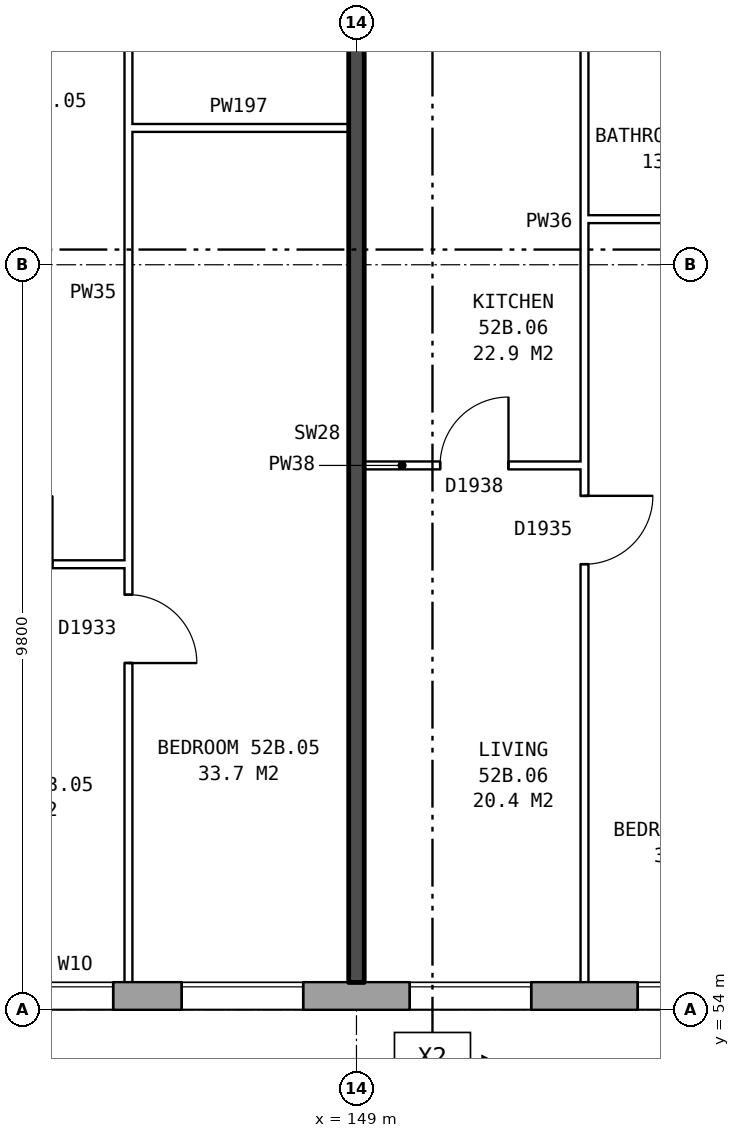
"""IFC4 building model, lengths in metres.
Left out: names, types, materials, properties, quantities, classifications, styles, units other than length and angle.
Written with IfcOpenShell. Run it as: python <this file> out.ifc"""

import sys

from ifc_helpers import new_model, si_unit, direction, frame, frame_2d, origin, place, context, subcontext, project, spatial, rectangle, extrude, element, fill, save


model = new_model("IFC4")
c1 = context("Model", 3, precision=1e-05, world=origin(), true_north=direction((0.0, 1.0)))
c2 = subcontext(c1, "Body", "Model", "MODEL_VIEW")
j1 = project(units=[si_unit("LENGTHUNIT", "METRE"), si_unit("PLANEANGLEUNIT", "RADIAN")], contexts=[c1])
p1 = place(None, origin())
s1 = spatial("IfcSite", under=j1, at=p1, CompositionType="ELEMENT")
p2 = place(p1, origin())
s2 = spatial("IfcBuilding", under=s1, at=p2, CompositionType="ELEMENT")
p3 = place(p2, frame((0.0, 0.0, 185.1)))
s3 = spatial("IfcBuildingStorey", under=s2, at=p3, CompositionType="ELEMENT", Elevation=185.1)
p4 = place(p3, frame((134.075, 54.18, 0.0), z_axis=(0.0, 0.0, 1.0), x_axis=(1.0, 0.0, 0.0)))
e1 = element("IfcWall", 1, at=p4, inside=s3, PredefinedType="STANDARD", context=c2, shape_type="SweptSolid", body=[
    extrude(rectangle(XDim=33.101, YDim=0.36, at=frame_2d((16.55, 0.0))), origin(), (0.0, 0.0, 1.0), 2.85),
])
p5 = place(p4, frame((0.625, 0.0, 0.8)))
e2 = element("IfcOpeningElement", 2, at=p5, cuts=e1, PredefinedType="OPENING", context=c2, shape_type="SweptSolid", body=[
    extrude(rectangle(XDim=1.6, YDim=1.8, at=frame_2d((0.8, 0.9))), frame((0.0, 0.19, 0.0), z_axis=(0.0, -1.0, 0.0), x_axis=(1.0, 0.0, 0.0)), (0.0, 0.0, 1.0), 0.38),
])
p6 = place(p4, frame((3.625, 0.0, 0.8)))
e3 = element("IfcOpeningElement", 3, at=p6, cuts=e1, PredefinedType="OPENING", context=c2, shape_type="SweptSolid", body=[
    extrude(rectangle(XDim=1.6, YDim=1.8, at=frame_2d((0.8, 0.9))), frame((0.0, 0.19, 0.0), z_axis=(0.0, -1.0, 0.0), x_axis=(1.0, 0.0, 0.0)), (0.0, 0.0, 1.0), 0.38),
])
p7 = place(p4, frame((6.625, 0.0, 0.8)))
e4 = element("IfcOpeningElement", 4, at=p7, cuts=e1, PredefinedType="OPENING", context=c2, shape_type="SweptSolid", body=[
    extrude(rectangle(XDim=1.6, YDim=1.8, at=frame_2d((0.8, 0.9))), frame((0.0, 0.19, 0.0), z_axis=(0.0, -1.0, 0.0), x_axis=(1.0, 0.0, 0.0)), (0.0, 0.0, 1.0), 0.38),
])
p8 = place(p4, frame((9.125, 0.0, 1.65)))
e5 = element("IfcOpeningElement", 5, at=p8, cuts=e1, PredefinedType="OPENING", context=c2, shape_type="SweptSolid", body=[
    extrude(rectangle(XDim=0.6, YDim=0.9, at=frame_2d((0.3, 0.45))), frame((0.0, 0.19, 0.0), z_axis=(0.0, -1.0, 0.0), x_axis=(1.0, 0.0, 0.0)), (0.0, 0.0, 1.0), 0.38),
])
p9 = place(p4, frame((12.625, 0.0, 0.8)))
e6 = element("IfcOpeningElement", 6, at=p9, cuts=e1, PredefinedType="OPENING", context=c2, shape_type="SweptSolid", body=[
    extrude(rectangle(XDim=1.6, YDim=1.8, at=frame_2d((0.8, 0.9))), frame((0.0, 0.19, 0.0), z_axis=(0.0, -1.0, 0.0), x_axis=(1.0, 0.0, 0.0)), (0.0, 0.0, 1.0), 0.38),
])
p10 = place(p4, frame((15.625, 0.0, 0.8)))
e7 = element("IfcOpeningElement", 7, at=p10, cuts=e1, PredefinedType="OPENING", context=c2, shape_type="SweptSolid", body=[
    extrude(rectangle(XDim=1.6, YDim=1.8, at=frame_2d((0.8, 0.9))), frame((0.0, 0.19, 0.0), z_axis=(0.0, -1.0, 0.0), x_axis=(1.0, 0.0, 0.0)), (0.0, 0.0, 1.0), 0.38),
])
p11 = place(p4, frame((18.625, 0.0, 0.8)))
e8 = element("IfcOpeningElement", 8, at=p11, cuts=e1, PredefinedType="OPENING", context=c2, shape_type="SweptSolid", body=[
    extrude(rectangle(XDim=1.6, YDim=1.8, at=frame_2d((0.8, 0.9))), frame((0.0, 0.19, 0.0), z_axis=(0.0, -1.0, 0.0), x_axis=(1.0, 0.0, 0.0)), (0.0, 0.0, 1.0), 0.38),
])
p12 = place(p4, frame((21.125, 0.0, 0.8)))
e9 = element("IfcOpeningElement", 9, at=p12, cuts=e1, PredefinedType="OPENING", context=c2, shape_type="SweptSolid", body=[
    extrude(rectangle(XDim=0.8, YDim=1.2, at=frame_2d((0.4, 0.6))), frame((0.0, 0.19, 0.0), z_axis=(0.0, -1.0, 0.0), x_axis=(1.0, 0.0, 0.0)), (0.0, 0.0, 1.0), 0.38),
])
p13 = place(p4, frame((24.625, 0.0, 0.8)))
e10 = element("IfcOpeningElement", 10, at=p13, cuts=e1, PredefinedType="OPENING", context=c2, shape_type="SweptSolid", body=[
    extrude(rectangle(XDim=1.6, YDim=1.8, at=frame_2d((0.8, 0.9))), frame((0.0, 0.19, 0.0), z_axis=(0.0, -1.0, 0.0), x_axis=(1.0, 0.0, 0.0)), (0.0, 0.0, 1.0), 0.38),
])
p14 = place(p4, frame((27.625, 0.0, 0.8)))
e11 = element("IfcOpeningElement", 11, at=p14, cuts=e1, PredefinedType="OPENING", context=c2, shape_type="SweptSolid", body=[
    extrude(rectangle(XDim=1.6, YDim=1.8, at=frame_2d((0.8, 0.9))), frame((0.0, 0.19, 0.0), z_axis=(0.0, -1.0, 0.0), x_axis=(1.0, 0.0, 0.0)), (0.0, 0.0, 1.0), 0.38),
])
p15 = place(p4, frame((30.625, 0.0, 0.8)))
e12 = element("IfcOpeningElement", 12, at=p15, cuts=e1, PredefinedType="OPENING", context=c2, shape_type="SweptSolid", body=[
    extrude(rectangle(XDim=1.6, YDim=1.8, at=frame_2d((0.8, 0.9))), frame((0.0, 0.19, 0.0), z_axis=(0.0, -1.0, 0.0), x_axis=(1.0, 0.0, 0.0)), (0.0, 0.0, 1.0), 0.38),
])
p16 = place(p4, frame((10.725, 0.0, 0.35)))
e13 = element("IfcOpeningElement", 13, at=p16, cuts=e1, PredefinedType="OPENING", context=c2, shape_type="SweptSolid", body=[
    extrude(rectangle(XDim=1.0, YDim=1.2, at=frame_2d((0.5, 0.6))), frame((0.0, 0.19, 0.0), z_axis=(0.0, -1.0, 0.0), x_axis=(1.0, 0.0, 0.0)), (0.0, 0.0, 1.0), 0.38),
])
p17 = place(p4, frame((23.525, 0.0, 1.4)))
e14 = element("IfcOpeningElement", 14, at=p17, cuts=e1, PredefinedType="OPENING", context=c2, shape_type="SweptSolid", body=[
    extrude(rectangle(XDim=0.8, YDim=1.2, at=frame_2d((0.4, 0.6))), frame((0.0, 0.19, 0.0), z_axis=(0.0, -1.0, 0.0), x_axis=(1.0, 0.0, 0.0)), (0.0, 0.0, 1.0), 0.38),
])
p18 = place(p3, frame((143.1, 59.86, 0.0), z_axis=(0.0, 0.0, 1.0), x_axis=(1.0, 0.0, 0.0)))
e15 = element("IfcWall", 15, at=p18, inside=s3, PredefinedType="PARTITIONING", context=c2, shape_type="SweptSolid", body=[
    extrude(rectangle(XDim=2.9, YDim=0.1, at=frame_2d((1.45, 0.0))), origin(), (0.0, 0.0, 1.0), 2.85),
])
p19 = place(p18, frame((1.0, 0.0, 0.0)))
e16 = element("IfcOpeningElement", 16, at=p19, cuts=e15, PredefinedType="OPENING", context=c2, shape_type="SweptSolid", body=[
    extrude(rectangle(XDim=0.9, YDim=2.1, at=frame_2d((0.45, 1.05))), frame((0.0, 0.06, 0.0), z_axis=(0.0, -1.0, 0.0), x_axis=(1.0, 0.0, 0.0)), (0.0, 0.0, 1.0), 0.12),
])
p20 = place(p3, frame((149.1, 61.16, 0.0), z_axis=(0.0, 0.0, 1.0), x_axis=(1.0, 0.0, 0.0)))
e17 = element("IfcWall", 17, at=p20, inside=s3, PredefinedType="PARTITIONING", context=c2, shape_type="SweptSolid", body=[
    extrude(rectangle(XDim=2.9, YDim=0.1, at=frame_2d((1.45, 0.0))), origin(), (0.0, 0.0, 1.0), 2.85),
])
p21 = place(p20, frame((1.0, 0.0, 0.0)))
e18 = element("IfcOpeningElement", 18, at=p21, cuts=e17, PredefinedType="OPENING", context=c2, shape_type="SweptSolid", body=[
    extrude(rectangle(XDim=0.9, YDim=2.1, at=frame_2d((0.45, 1.05))), frame((0.0, 0.06, 0.0), z_axis=(0.0, -1.0, 0.0), x_axis=(1.0, 0.0, 0.0)), (0.0, 0.0, 1.0), 0.12),
])
for number, where, z_axis, x_axis in (
    (19, (152.0, 64.4, 0.0), (0.0, 0.0, 1.0), (1.0, 0.0, 0.0)),
    (20, (146.0, 65.6, 0.0), (0.0, 0.0, 1.0), (1.0, 0.0, 0.0)),
):
    element("IfcWall", number, at=place(p3, frame(where, z_axis=z_axis, x_axis=x_axis)), inside=s3, PredefinedType="PARTITIONING", context=c2, shape_type="SweptSolid", body=[
        extrude(rectangle(XDim=2.9, YDim=0.1, at=frame_2d((1.45, 0.0))), origin(), (0.0, 0.0, 1.0), 2.85),
    ])
p22 = place(p3, frame((146.0, 54.36, 0.0), z_axis=(0.0, 0.0, 1.0), x_axis=(0.0, 1.0, 0.0)))
e21 = element("IfcWall", 21, at=p22, inside=s3, PredefinedType="PARTITIONING", context=c2, shape_type="SweptSolid", body=[
    extrude(rectangle(XDim=14.34, YDim=0.1, at=frame_2d((7.17, 0.0))), origin(), (0.0, 0.0, 1.0), 2.85),
])
p23 = place(p22, frame((4.2, 0.0, 0.0)))
e22 = element("IfcOpeningElement", 22, at=p23, cuts=e21, PredefinedType="OPENING", context=c2, shape_type="SweptSolid", body=[
    extrude(rectangle(XDim=0.9, YDim=2.1, at=frame_2d((0.45, 1.05))), frame((0.0, 0.06, 0.0), z_axis=(0.0, -1.0, 0.0), x_axis=(1.0, 0.0, 0.0)), (0.0, 0.0, 1.0), 0.12),
])
p24 = place(p22, frame((13.04, 0.0, 0.0)))
e23 = element("IfcOpeningElement", 23, at=p24, cuts=e21, PredefinedType="OPENING", context=c2, shape_type="SweptSolid", body=[
    extrude(rectangle(XDim=0.9, YDim=2.1, at=frame_2d((0.45, 1.05))), frame((0.0, 0.06, 0.0), z_axis=(0.0, -1.0, 0.0), x_axis=(1.0, 0.0, 0.0)), (0.0, 0.0, 1.0), 0.12),
])
p25 = place(p3, frame((149.0, 54.36, 0.0), z_axis=(0.0, 0.0, 1.0), x_axis=(0.0, 1.0, 0.0)))
e24 = element("IfcWall", 24, at=p25, inside=s3, PredefinedType="SOLIDWALL", context=c2, shape_type="SweptSolid", body=[
    extrude(rectangle(XDim=14.44, YDim=0.2, at=frame_2d((7.22, 0.0))), origin(), (0.0, 0.0, 1.0), 2.85),
])
p26 = place(p3, frame((152.0, 54.36, 0.0), z_axis=(0.0, 0.0, 1.0), x_axis=(0.0, 1.0, 0.0)))
e25 = element("IfcWall", 25, at=p26, inside=s3, PredefinedType="PARTITIONING", context=c2, shape_type="SweptSolid", body=[
    extrude(rectangle(XDim=14.34, YDim=0.1, at=frame_2d((7.17, 0.0))), origin(), (0.0, 0.0, 1.0), 2.85),
])
p27 = place(p26, frame((5.5, 0.0, 0.0)))
e26 = element("IfcOpeningElement", 26, at=p27, cuts=e25, PredefinedType="OPENING", context=c2, shape_type="SweptSolid", body=[
    extrude(rectangle(XDim=0.9, YDim=2.1, at=frame_2d((0.45, 1.05))), frame((0.0, 0.06, 0.0), z_axis=(0.0, -1.0, 0.0), x_axis=(1.0, 0.0, 0.0)), (0.0, 0.0, 1.0), 0.12),
])
p28 = place(p26, frame((13.04, 0.0, 0.0)))
e27 = element("IfcOpeningElement", 27, at=p28, cuts=e25, PredefinedType="OPENING", context=c2, shape_type="SweptSolid", body=[
    extrude(rectangle(XDim=0.9, YDim=2.1, at=frame_2d((0.45, 1.05))), frame((0.0, 0.06, 0.0), z_axis=(0.0, -1.0, 0.0), x_axis=(1.0, 0.0, 0.0)), (0.0, 0.0, 1.0), 0.12),
])
p29 = place(p9, origin())
e28 = element("IfcWindow", 28, at=p29, inside=s3, PartitioningType="SINGLE_PANEL", PredefinedType="WINDOW", context=c2, shape_type="SweptSolid", body=[
    extrude(rectangle(XDim=1.6, YDim=1.8, at=frame_2d((0.8, 0.9))), frame((0.0, 0.15, 0.0), z_axis=(0.0, -1.0, 0.0), x_axis=(1.0, 0.0, 0.0)), (0.0, 0.0, 1.0), 0.06),
])
fill(e6, e28)
p30 = place(p10, origin())
e29 = element("IfcWindow", 29, at=p30, inside=s3, PartitioningType="SINGLE_PANEL", PredefinedType="WINDOW", context=c2, shape_type="SweptSolid", body=[
    extrude(rectangle(XDim=1.6, YDim=1.8, at=frame_2d((0.8, 0.9))), frame((0.0, 0.15, 0.0), z_axis=(0.0, -1.0, 0.0), x_axis=(1.0, 0.0, 0.0)), (0.0, 0.0, 1.0), 0.06),
])
fill(e7, e29)
p31 = place(p11, origin())
e30 = element("IfcWindow", 30, at=p31, inside=s3, PartitioningType="SINGLE_PANEL", PredefinedType="WINDOW", context=c2, shape_type="SweptSolid", body=[
    extrude(rectangle(XDim=1.6, YDim=1.8, at=frame_2d((0.8, 0.9))), frame((0.0, 0.15, 0.0), z_axis=(0.0, -1.0, 0.0), x_axis=(1.0, 0.0, 0.0)), (0.0, 0.0, 1.0), 0.06),
])
fill(e8, e30)
p32 = place(p23, frame((0.9, 0.0, 0.0), z_axis=(0.0, 0.0, 1.0), x_axis=(-1.0, 0.0, 0.0)))
e31 = element("IfcDoor", 31, at=p32, inside=s3, OperationType="SINGLE_SWING_RIGHT", PredefinedType="DOOR", context=c2, shape_type="SweptSolid", body=[
    extrude(rectangle(XDim=0.9, YDim=2.1, at=frame_2d((0.45, 1.05))), frame((0.0, 0.025, 0.0), z_axis=(0.0, -1.0, 0.0), x_axis=(1.0, 0.0, 0.0)), (0.0, 0.0, 1.0), 0.05),
])
fill(e22, e31)
p33 = place(p27, frame((0.9, 0.0, 0.0), z_axis=(0.0, 0.0, 1.0), x_axis=(-1.0, 0.0, 0.0)))
e32 = element("IfcDoor", 32, at=p33, inside=s3, OperationType="SINGLE_SWING_LEFT", PredefinedType="DOOR", context=c2, shape_type="SweptSolid", body=[
    extrude(rectangle(XDim=0.9, YDim=2.1, at=frame_2d((0.45, 1.05))), frame((0.0, 0.025, 0.0), z_axis=(0.0, -1.0, 0.0), x_axis=(1.0, 0.0, 0.0)), (0.0, 0.0, 1.0), 0.05),
])
fill(e26, e32)
p34 = place(p21, origin())
e33 = element("IfcDoor", 33, at=p34, inside=s3, OperationType="SINGLE_SWING_RIGHT", PredefinedType="DOOR", context=c2, shape_type="SweptSolid", body=[
    extrude(rectangle(XDim=0.9, YDim=2.1, at=frame_2d((0.45, 1.05))), frame((0.0, 0.025, 0.0), z_axis=(0.0, -1.0, 0.0), x_axis=(1.0, 0.0, 0.0)), (0.0, 0.0, 1.0), 0.05),
])
fill(e18, e33)
p35 = place(p16, origin())
e34 = element("IfcWindow", 34, at=p35, inside=s3, PartitioningType="SINGLE_PANEL", PredefinedType="WINDOW", context=c2, shape_type="SweptSolid", body=[
    extrude(rectangle(XDim=1.0, YDim=1.2, at=frame_2d((0.5, 0.6))), frame((0.0, 0.15, 0.0), z_axis=(0.0, -1.0, 0.0), x_axis=(1.0, 0.0, 0.0)), (0.0, 0.0, 1.0), 0.06),
])
fill(e13, e34)
save(model, sys.argv[1])
